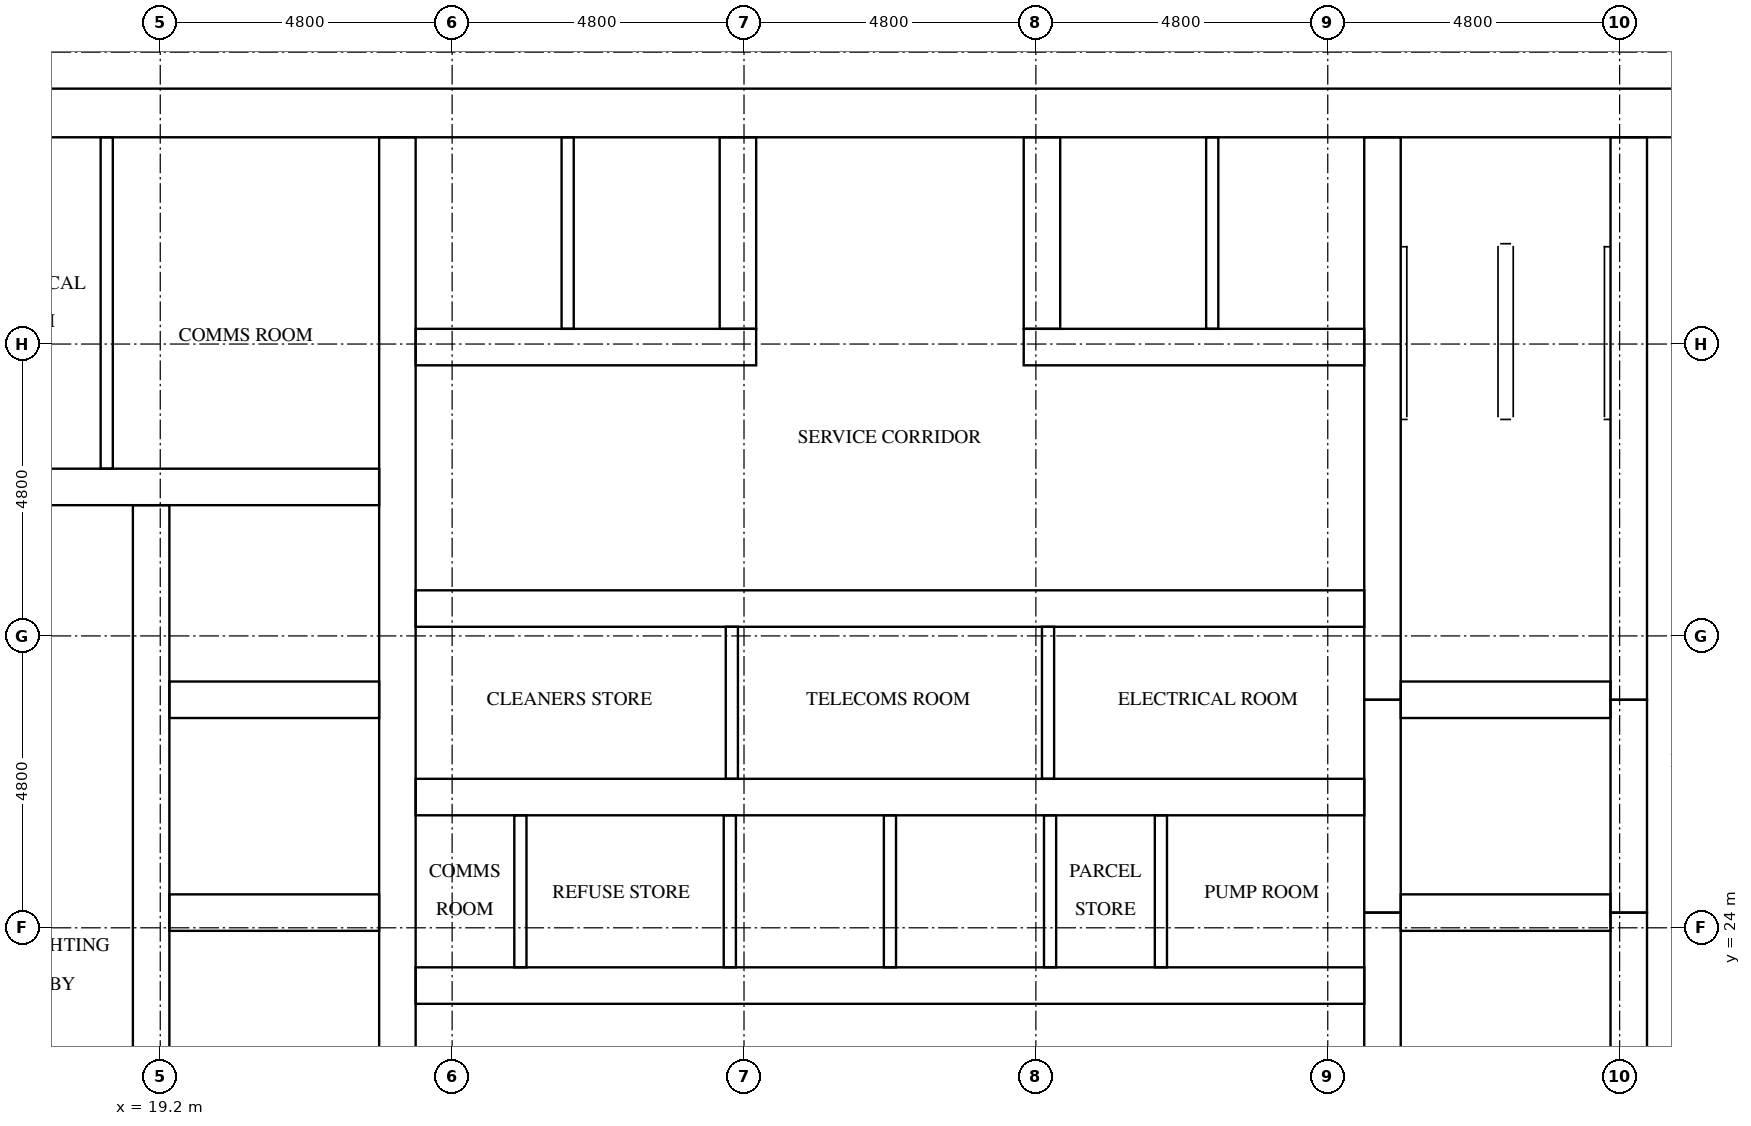
"""IFC4 building model, lengths in metres.
Left out: names, types, materials, properties, quantities, classifications, styles, units other than length and angle.
Written with IfcOpenShell. Run it as: python <this file> out.ifc"""

import sys

from ifc_helpers import new_model, si_unit, direction, frame, frame_2d, origin, place, context, subcontext, project, spatial, rectangle, extrude, element, fill, save


model = new_model("IFC4")
c1 = context("Model", 3, precision=1e-05, world=origin(), true_north=direction((0.0, 1.0)))
c2 = subcontext(c1, "Body", "Model", "MODEL_VIEW")
j1 = project(units=[si_unit("LENGTHUNIT", "METRE"), si_unit("PLANEANGLEUNIT", "RADIAN")], contexts=[c1])
p1 = place(None, origin())
s1 = spatial("IfcSite", under=j1, at=p1, CompositionType="ELEMENT")
p2 = place(p1, origin())
s2 = spatial("IfcBuilding", under=s1, at=p2, CompositionType="ELEMENT")
p3 = place(p2, frame((0.0, 0.0, 133.1)))
s3 = spatial("IfcBuildingStorey", under=s2, at=p3, CompositionType="ELEMENT", Elevation=133.1)
p4 = place(p3, frame((15.0, 37.4, 0.0), z_axis=(0.0, 0.0, 1.0), x_axis=(1.0, 0.0, 0.0)))
e1 = element("IfcWall", 1, at=p4, inside=s3, PredefinedType="SHEAR", context=c2, shape_type="SweptSolid", body=[
    extrude(rectangle(XDim=32.4, YDim=0.8, at=frame_2d((16.2, 0.0))), origin(), (0.0, 0.0, 1.0), 3.2),
])
p5 = place(p4, frame((15.3, 0.0, 0.0)))
e2 = element("IfcOpeningElement", 2, at=p5, cuts=e1, PredefinedType="OPENING", context=c2, shape_type="SweptSolid", body=[
    extrude(rectangle(XDim=1.8, YDim=2.1, at=frame_2d((0.9, 1.05))), frame((0.0, 0.41, 0.0), z_axis=(0.0, -1.0, 0.0), x_axis=(1.0, 0.0, 0.0)), (0.0, 0.0, 1.0), 0.82),
])
p6 = place(p4, frame((1.51, 0.0, 0.0)))
e3 = element("IfcOpeningElement", 3, at=p6, cuts=e1, PredefinedType="OPENING", context=c2, shape_type="SweptSolid", body=[
    extrude(rectangle(XDim=1.0, YDim=2.1, at=frame_2d((0.5, 1.05))), frame((0.0, 0.41, 0.0), z_axis=(0.0, -1.0, 0.0), x_axis=(1.0, 0.0, 0.0)), (0.0, 0.0, 1.0), 0.82),
])
p7 = place(p4, frame((5.11, 0.0, 0.0)))
e4 = element("IfcOpeningElement", 4, at=p7, cuts=e1, PredefinedType="OPENING", context=c2, shape_type="SweptSolid", body=[
    extrude(rectangle(XDim=1.0, YDim=2.1, at=frame_2d((0.5, 1.05))), frame((0.0, 0.41, 0.0), z_axis=(0.0, -1.0, 0.0), x_axis=(1.0, 0.0, 0.0)), (0.0, 0.0, 1.0), 0.82),
])
p8 = place(p3, frame((19.05, 15.8, 0.0), z_axis=(0.0, 0.0, 1.0), x_axis=(0.0, 1.0, 0.0)))
e5 = element("IfcWall", 5, at=p8, inside=s3, PredefinedType="SHEAR", context=c2, shape_type="SweptSolid", body=[
    extrude(rectangle(XDim=15.15, YDim=0.6, at=frame_2d((7.575, 0.0))), origin(), (0.0, 0.0, 1.0), 3.2),
])
p9 = place(p8, frame((9.65, 0.0, 0.0)))
e6 = element("IfcOpeningElement", 6, at=p9, cuts=e5, PredefinedType="OPENING", context=c2, shape_type="SweptSolid", body=[
    extrude(rectangle(XDim=1.1, YDim=2.1, at=frame_2d((0.55, 1.05))), frame((0.0, 0.31, 0.0), z_axis=(0.0, -1.0, 0.0), x_axis=(1.0, 0.0, 0.0)), (0.0, 0.0, 1.0), 0.62),
])
p10 = place(p8, frame((13.15, 0.0, 0.0)))
e7 = element("IfcOpeningElement", 7, at=p10, cuts=e5, PredefinedType="OPENING", context=c2, shape_type="SweptSolid", body=[
    extrude(rectangle(XDim=1.1, YDim=2.1, at=frame_2d((0.55, 1.05))), frame((0.0, 0.31, 0.0), z_axis=(0.0, -1.0, 0.0), x_axis=(1.0, 0.0, 0.0)), (0.0, 0.0, 1.0), 0.62),
])
p11 = place(p8, frame((0.4, 0.0, 0.0)))
e8 = element("IfcOpeningElement", 8, at=p11, cuts=e5, PredefinedType="OPENING", context=c2, shape_type="SweptSolid", body=[
    extrude(rectangle(XDim=1.2, YDim=2.1, at=frame_2d((0.6, 1.05))), frame((0.0, 0.31, 0.0), z_axis=(0.0, -1.0, 0.0), x_axis=(1.0, 0.0, 0.0)), (0.0, 0.0, 1.0), 0.62),
])
p12 = place(p3, frame((23.1, 15.8, 0.0), z_axis=(0.0, 0.0, 1.0), x_axis=(0.0, 1.0, 0.0)))
e9 = element("IfcWall", 9, at=p12, inside=s3, PredefinedType="SHEAR", context=c2, shape_type="SweptSolid", body=[
    extrude(rectangle(XDim=21.2, YDim=0.6, at=frame_2d((10.6, 0.0))), origin(), (0.0, 0.0, 1.0), 3.2),
])
p13 = place(p3, frame((39.3, 15.8, 0.0), z_axis=(0.0, 0.0, 1.0), x_axis=(0.0, 1.0, 0.0)))
e10 = element("IfcWall", 10, at=p13, inside=s3, PredefinedType="SHEAR", context=c2, shape_type="SweptSolid", body=[
    extrude(rectangle(XDim=8.45, YDim=0.6, at=frame_2d((4.225, 0.0))), origin(), (0.0, 0.0, 1.0), 3.2),
])
p14 = place(p3, frame((39.3, 24.25, 0.0), z_axis=(0.0, 0.0, 1.0), x_axis=(0.0, 1.0, 0.0)))
e11 = element("IfcWall", 11, at=p14, inside=s3, PredefinedType="SHEAR", context=c2, shape_type="SweptSolid", body=[
    extrude(rectangle(XDim=3.5, YDim=0.6, at=frame_2d((1.75, 0.0))), origin(), (0.0, 0.0, 1.0), 3.2),
])
p15 = place(p3, frame((39.3, 27.75, 0.0), z_axis=(0.0, 0.0, 1.0), x_axis=(0.0, 1.0, 0.0)))
e12 = element("IfcWall", 12, at=p15, inside=s3, PredefinedType="SHEAR", context=c2, shape_type="SweptSolid", body=[
    extrude(rectangle(XDim=9.25, YDim=0.6, at=frame_2d((4.625, 0.0))), origin(), (0.0, 0.0, 1.0), 3.2),
])
p16 = place(p3, frame((43.35, 15.8, 0.0), z_axis=(0.0, 0.0, 1.0), x_axis=(0.0, 1.0, 0.0)))
e13 = element("IfcWall", 13, at=p16, inside=s3, PredefinedType="SHEAR", context=c2, shape_type="SweptSolid", body=[
    extrude(rectangle(XDim=8.45, YDim=0.6, at=frame_2d((4.225, 0.0))), origin(), (0.0, 0.0, 1.0), 3.2),
])
p17 = place(p16, frame((0.4, 0.0, 0.0)))
e14 = element("IfcOpeningElement", 14, at=p17, cuts=e13, PredefinedType="OPENING", context=c2, shape_type="SweptSolid", body=[
    extrude(rectangle(XDim=1.2, YDim=2.1, at=frame_2d((0.6, 1.05))), frame((0.0, 0.31, 0.0), z_axis=(0.0, -1.0, 0.0), x_axis=(1.0, 0.0, 0.0)), (0.0, 0.0, 1.0), 0.62),
])
p18 = place(p3, frame((43.35, 24.25, 0.0), z_axis=(0.0, 0.0, 1.0), x_axis=(0.0, 1.0, 0.0)))
e15 = element("IfcWall", 15, at=p18, inside=s3, PredefinedType="SHEAR", context=c2, shape_type="SweptSolid", body=[
    extrude(rectangle(XDim=3.5, YDim=0.6, at=frame_2d((1.75, 0.0))), origin(), (0.0, 0.0, 1.0), 3.2),
])
p19 = place(p18, frame((1.2, 0.0, 0.0)))
e16 = element("IfcOpeningElement", 16, at=p19, cuts=e15, PredefinedType="OPENING", context=c2, shape_type="SweptSolid", body=[
    extrude(rectangle(XDim=1.1, YDim=2.1, at=frame_2d((0.55, 1.05))), frame((0.0, 0.31, 0.0), z_axis=(0.0, -1.0, 0.0), x_axis=(1.0, 0.0, 0.0)), (0.0, 0.0, 1.0), 0.62),
])
p20 = place(p3, frame((43.35, 27.75, 0.0), z_axis=(0.0, 0.0, 1.0), x_axis=(0.0, 1.0, 0.0)))
e17 = element("IfcWall", 17, at=p20, inside=s3, PredefinedType="SHEAR", context=c2, shape_type="SweptSolid", body=[
    extrude(rectangle(XDim=9.25, YDim=0.6, at=frame_2d((4.625, 0.0))), origin(), (0.0, 0.0, 1.0), 3.2),
])
p21 = place(p20, frame((7.65, 0.0, 0.0)))
e18 = element("IfcOpeningElement", 18, at=p21, cuts=e17, PredefinedType="OPENING", context=c2, shape_type="SweptSolid", body=[
    extrude(rectangle(XDim=1.2, YDim=2.1, at=frame_2d((0.6, 1.05))), frame((0.0, 0.31, 0.0), z_axis=(0.0, -1.0, 0.0), x_axis=(1.0, 0.0, 0.0)), (0.0, 0.0, 1.0), 0.62),
])
for number, where, z_axis, x_axis in (
    (19, (19.35, 24.25, 0.0), (0.0, 0.0, 1.0), (1.0, 0.0, 0.0)),
    (20, (19.35, 27.75, 0.0), (0.0, 0.0, 1.0), (1.0, 0.0, 0.0)),
):
    element("IfcWall", number, at=place(p3, frame(where, z_axis=z_axis, x_axis=x_axis)), inside=s3, PredefinedType="SHEAR", context=c2, shape_type="SweptSolid", body=[
        extrude(rectangle(XDim=3.45, YDim=0.6, at=frame_2d((1.725, 0.0))), origin(), (0.0, 0.0, 1.0), 3.2),
    ])
p22 = place(p3, frame((15.8, 31.25, 0.0), z_axis=(0.0, 0.0, 1.0), x_axis=(1.0, 0.0, 0.0)))
e21 = element("IfcWall", 21, at=p22, inside=s3, PredefinedType="SHEAR", context=c2, shape_type="SweptSolid", body=[
    extrude(rectangle(XDim=7.0, YDim=0.6, at=frame_2d((3.5, 0.0))), origin(), (0.0, 0.0, 1.0), 3.2),
])
for number, where, z_axis, x_axis in (
    (22, (39.6, 24.25, 0.0), (0.0, 0.0, 1.0), (1.0, 0.0, 0.0)),
    (23, (39.6, 27.75, 0.0), (0.0, 0.0, 1.0), (1.0, 0.0, 0.0)),
):
    element("IfcWall", number, at=place(p3, frame(where, z_axis=z_axis, x_axis=x_axis)), inside=s3, PredefinedType="SHEAR", context=c2, shape_type="SweptSolid", body=[
        extrude(rectangle(XDim=3.45, YDim=0.6, at=frame_2d((1.725, 0.0))), origin(), (0.0, 0.0, 1.0), 3.2),
    ])
p23 = place(p3, frame((23.4, 23.05, 0.0), z_axis=(0.0, 0.0, 1.0), x_axis=(1.0, 0.0, 0.0)))
e24 = element("IfcWall", 24, at=p23, inside=s3, PredefinedType="SHEAR", context=c2, shape_type="SweptSolid", body=[
    extrude(rectangle(XDim=15.6, YDim=0.6, at=frame_2d((7.8, 0.0))), origin(), (0.0, 0.0, 1.0), 3.2),
])
p24 = place(p23, frame((0.311, 0.0, 0.0)))
e25 = element("IfcOpeningElement", 25, at=p24, cuts=e24, PredefinedType="OPENING", context=c2, shape_type="SweptSolid", body=[
    extrude(rectangle(XDim=1.0, YDim=2.1, at=frame_2d((0.5, 1.05))), frame((0.0, 0.31, 0.0), z_axis=(0.0, -1.0, 0.0), x_axis=(1.0, 0.0, 0.0)), (0.0, 0.0, 1.0), 0.62),
])
p25 = place(p23, frame((2.945, 0.0, 0.0)))
e26 = element("IfcOpeningElement", 26, at=p25, cuts=e24, PredefinedType="OPENING", context=c2, shape_type="SweptSolid", body=[
    extrude(rectangle(XDim=1.0, YDim=2.1, at=frame_2d((0.5, 1.05))), frame((0.0, 0.31, 0.0), z_axis=(0.0, -1.0, 0.0), x_axis=(1.0, 0.0, 0.0)), (0.0, 0.0, 1.0), 0.62),
])
p26 = place(p23, frame((10.845, 0.0, 0.0)))
e27 = element("IfcOpeningElement", 27, at=p26, cuts=e24, PredefinedType="OPENING", context=c2, shape_type="SweptSolid", body=[
    extrude(rectangle(XDim=1.0, YDim=2.1, at=frame_2d((0.5, 1.05))), frame((0.0, 0.31, 0.0), z_axis=(0.0, -1.0, 0.0), x_axis=(1.0, 0.0, 0.0)), (0.0, 0.0, 1.0), 0.62),
])
p27 = place(p23, frame((13.478, 0.0, 0.0)))
e28 = element("IfcOpeningElement", 28, at=p27, cuts=e24, PredefinedType="OPENING", context=c2, shape_type="SweptSolid", body=[
    extrude(rectangle(XDim=1.0, YDim=2.1, at=frame_2d((0.5, 1.05))), frame((0.0, 0.31, 0.0), z_axis=(0.0, -1.0, 0.0), x_axis=(1.0, 0.0, 0.0)), (0.0, 0.0, 1.0), 0.62),
])
p28 = place(p3, frame((23.4, 26.15, 0.0), z_axis=(0.0, 0.0, 1.0), x_axis=(1.0, 0.0, 0.0)))
e29 = element("IfcWall", 29, at=p28, inside=s3, PredefinedType="SHEAR", context=c2, shape_type="SweptSolid", body=[
    extrude(rectangle(XDim=15.6, YDim=0.6, at=frame_2d((7.8, 0.0))), origin(), (0.0, 0.0, 1.0), 3.2),
])
p29 = place(p3, frame((23.4, 29.25, 0.0), z_axis=(0.0, 0.0, 1.0), x_axis=(1.0, 0.0, 0.0)))
e30 = element("IfcWall", 30, at=p29, inside=s3, PredefinedType="SHEAR", context=c2, shape_type="SweptSolid", body=[
    extrude(rectangle(XDim=15.6, YDim=0.6, at=frame_2d((7.8, 0.0))), origin(), (0.0, 0.0, 1.0), 3.2),
])
p30 = place(p29, frame((2.05, 0.0, 0.0)))
e31 = element("IfcOpeningElement", 31, at=p30, cuts=e30, PredefinedType="OPENING", context=c2, shape_type="SweptSolid", body=[
    extrude(rectangle(XDim=1.0, YDim=2.1, at=frame_2d((0.5, 1.05))), frame((0.0, 0.31, 0.0), z_axis=(0.0, -1.0, 0.0), x_axis=(1.0, 0.0, 0.0)), (0.0, 0.0, 1.0), 0.62),
])
p31 = place(p29, frame((7.3, 0.0, 0.0)))
e32 = element("IfcOpeningElement", 32, at=p31, cuts=e30, PredefinedType="OPENING", context=c2, shape_type="SweptSolid", body=[
    extrude(rectangle(XDim=1.0, YDim=2.1, at=frame_2d((0.5, 1.05))), frame((0.0, 0.31, 0.0), z_axis=(0.0, -1.0, 0.0), x_axis=(1.0, 0.0, 0.0)), (0.0, 0.0, 1.0), 0.62),
])
p32 = place(p29, frame((12.55, 0.0, 0.0)))
e33 = element("IfcOpeningElement", 33, at=p32, cuts=e30, PredefinedType="OPENING", context=c2, shape_type="SweptSolid", body=[
    extrude(rectangle(XDim=1.0, YDim=2.1, at=frame_2d((0.5, 1.05))), frame((0.0, 0.31, 0.0), z_axis=(0.0, -1.0, 0.0), x_axis=(1.0, 0.0, 0.0)), (0.0, 0.0, 1.0), 0.62),
])
for number, where, z_axis, x_axis in (
    (34, (23.4, 33.55, 0.0), (0.0, 0.0, 1.0), (1.0, 0.0, 0.0)),
    (35, (33.4, 33.55, 0.0), (0.0, 0.0, 1.0), (1.0, 0.0, 0.0)),
):
    element("IfcWall", number, at=place(p3, frame(where, z_axis=z_axis, x_axis=x_axis)), inside=s3, PredefinedType="SHEAR", context=c2, shape_type="SweptSolid", body=[
        extrude(rectangle(XDim=5.6, YDim=0.6, at=frame_2d((2.8, 0.0))), origin(), (0.0, 0.0, 1.0), 3.2),
    ])
for number, where, z_axis, x_axis in (
    (36, (28.7, 33.85, 0.0), (0.0, 0.0, 1.0), (0.0, 1.0, 0.0)),
    (37, (33.7, 33.85, 0.0), (0.0, 0.0, 1.0), (0.0, 1.0, 0.0)),
):
    element("IfcWall", number, at=place(p3, frame(where, z_axis=z_axis, x_axis=x_axis)), inside=s3, PredefinedType="SHEAR", context=c2, shape_type="SweptSolid", body=[
        extrude(rectangle(XDim=3.15, YDim=0.6, at=frame_2d((1.575, 0.0))), origin(), (0.0, 0.0, 1.0), 3.2),
    ])
for number, where, z_axis, x_axis in (
    (38, (28.567, 23.35, 0.0), (0.0, 0.0, 1.0), (0.0, 1.0, 0.0)),
    (39, (31.2, 23.35, 0.0), (0.0, 0.0, 1.0), (0.0, 1.0, 0.0)),
    (40, (33.833, 23.35, 0.0), (0.0, 0.0, 1.0), (0.0, 1.0, 0.0)),
):
    element("IfcWall", number, at=place(p3, frame(where, z_axis=z_axis, x_axis=x_axis)), inside=s3, PredefinedType="SOLIDWALL", context=c2, shape_type="SweptSolid", body=[
        extrude(rectangle(XDim=2.5, YDim=0.2, at=frame_2d((1.25, 0.0))), origin(), (0.0, 0.0, 1.0), 3.2),
    ])
for number, where, z_axis, x_axis in (
    (41, (25.9, 33.85, 0.0), (0.0, 0.0, 1.0), (0.0, 1.0, 0.0)),
    (42, (36.5, 33.85, 0.0), (0.0, 0.0, 1.0), (0.0, 1.0, 0.0)),
):
    element("IfcWall", number, at=place(p3, frame(where, z_axis=z_axis, x_axis=x_axis)), inside=s3, PredefinedType="SOLIDWALL", context=c2, shape_type="SweptSolid", body=[
        extrude(rectangle(XDim=3.15, YDim=0.2, at=frame_2d((1.575, 0.0))), origin(), (0.0, 0.0, 1.0), 3.2),
    ])
p33 = place(p3, frame((18.32, 31.55, 0.0), z_axis=(0.0, 0.0, 1.0), x_axis=(0.0, 1.0, 0.0)))
e43 = element("IfcWall", 43, at=p33, inside=s3, PredefinedType="PARTITIONING", context=c2, shape_type="SweptSolid", body=[
    extrude(rectangle(XDim=5.45, YDim=0.2, at=frame_2d((2.725, 0.0))), origin(), (0.0, 0.0, 1.0), 3.2),
])
for number, where, z_axis, x_axis in (
    (44, (25.123, 23.35, 0.0), (0.0, 0.0, 1.0), (0.0, 1.0, 0.0)),
    (45, (35.656, 23.35, 0.0), (0.0, 0.0, 1.0), (0.0, 1.0, 0.0)),
    (46, (28.6, 26.45, 0.0), (0.0, 0.0, 1.0), (0.0, 1.0, 0.0)),
    (47, (33.8, 26.45, 0.0), (0.0, 0.0, 1.0), (0.0, 1.0, 0.0)),
):
    element("IfcWall", number, at=place(p3, frame(where, z_axis=z_axis, x_axis=x_axis)), inside=s3, PredefinedType="PARTITIONING", context=c2, shape_type="SweptSolid", body=[
        extrude(rectangle(XDim=2.5, YDim=0.2, at=frame_2d((1.25, 0.0))), origin(), (0.0, 0.0, 1.0), 3.2),
    ])
p34 = place(p9, origin())
e48 = element("IfcDoor", 48, at=p34, inside=s3, OperationType="DOUBLE_DOOR_SLIDING", PredefinedType="DOOR", context=c2, shape_type="SweptSolid", body=[
    extrude(rectangle(XDim=1.1, YDim=2.1, at=frame_2d((0.55, 1.05))), frame((0.0, 0.025, 0.0), z_axis=(0.0, -1.0, 0.0), x_axis=(1.0, 0.0, 0.0)), (0.0, 0.0, 1.0), 0.05),
])
fill(e6, e48)
p35 = place(p10, origin())
e49 = element("IfcDoor", 49, at=p35, inside=s3, OperationType="DOUBLE_DOOR_SLIDING", PredefinedType="DOOR", context=c2, shape_type="SweptSolid", body=[
    extrude(rectangle(XDim=1.1, YDim=2.1, at=frame_2d((0.55, 1.05))), frame((0.0, 0.025, 0.0), z_axis=(0.0, -1.0, 0.0), x_axis=(1.0, 0.0, 0.0)), (0.0, 0.0, 1.0), 0.05),
])
fill(e7, e49)
p36 = place(p19, origin())
e50 = element("IfcDoor", 50, at=p36, inside=s3, OperationType="DOUBLE_DOOR_SLIDING", PredefinedType="DOOR", context=c2, shape_type="SweptSolid", body=[
    extrude(rectangle(XDim=1.1, YDim=2.1, at=frame_2d((0.55, 1.05))), frame((0.0, 0.025, 0.0), z_axis=(0.0, -1.0, 0.0), x_axis=(1.0, 0.0, 0.0)), (0.0, 0.0, 1.0), 0.05),
])
fill(e16, e50)
p37 = place(p21, origin())
e51 = element("IfcDoor", 51, at=p37, inside=s3, OperationType="SINGLE_SWING_RIGHT", PredefinedType="DOOR", context=c2, shape_type="SweptSolid", body=[
    extrude(rectangle(XDim=1.2, YDim=2.1, at=frame_2d((0.6, 1.05))), frame((0.0, 0.025, 0.0), z_axis=(0.0, -1.0, 0.0), x_axis=(1.0, 0.0, 0.0)), (0.0, 0.0, 1.0), 0.05),
])
fill(e18, e51)
p38 = place(p5, origin())
e52 = element("IfcDoor", 52, at=p38, inside=s3, OperationType="DOUBLE_DOOR_SINGLE_SWING", PredefinedType="DOOR", context=c2, shape_type="SweptSolid", body=[
    extrude(rectangle(XDim=1.8, YDim=2.1, at=frame_2d((0.9, 1.05))), frame((0.0, 0.025, 0.0), z_axis=(0.0, -1.0, 0.0), x_axis=(1.0, 0.0, 0.0)), (0.0, 0.0, 1.0), 0.05),
])
fill(e2, e52)
p39 = place(p6, origin())
e53 = element("IfcDoor", 53, at=p39, inside=s3, OperationType="SINGLE_SWING_LEFT", PredefinedType="DOOR", context=c2, shape_type="SweptSolid", body=[
    extrude(rectangle(XDim=1.0, YDim=2.1, at=frame_2d((0.5, 1.05))), frame((0.0, 0.025, 0.0), z_axis=(0.0, -1.0, 0.0), x_axis=(1.0, 0.0, 0.0)), (0.0, 0.0, 1.0), 0.05),
])
fill(e3, e53)
p40 = place(p7, origin())
e54 = element("IfcDoor", 54, at=p40, inside=s3, OperationType="SINGLE_SWING_RIGHT", PredefinedType="DOOR", context=c2, shape_type="SweptSolid", body=[
    extrude(rectangle(XDim=1.0, YDim=2.1, at=frame_2d((0.5, 1.05))), frame((0.0, 0.025, 0.0), z_axis=(0.0, -1.0, 0.0), x_axis=(1.0, 0.0, 0.0)), (0.0, 0.0, 1.0), 0.05),
])
fill(e4, e54)
p41 = place(p24, frame((1.0, 0.0, 0.0), z_axis=(0.0, 0.0, 1.0), x_axis=(-1.0, 0.0, 0.0)))
e55 = element("IfcDoor", 55, at=p41, inside=s3, OperationType="SINGLE_SWING_LEFT", PredefinedType="DOOR", context=c2, shape_type="SweptSolid", body=[
    extrude(rectangle(XDim=1.0, YDim=2.1, at=frame_2d((0.5, 1.05))), frame((0.0, 0.025, 0.0), z_axis=(0.0, -1.0, 0.0), x_axis=(1.0, 0.0, 0.0)), (0.0, 0.0, 1.0), 0.05),
])
fill(e25, e55)
p42 = place(p25, frame((1.0, 0.0, 0.0), z_axis=(0.0, 0.0, 1.0), x_axis=(-1.0, 0.0, 0.0)))
e56 = element("IfcDoor", 56, at=p42, inside=s3, OperationType="SINGLE_SWING_RIGHT", PredefinedType="DOOR", context=c2, shape_type="SweptSolid", body=[
    extrude(rectangle(XDim=1.0, YDim=2.1, at=frame_2d((0.5, 1.05))), frame((0.0, 0.025, 0.0), z_axis=(0.0, -1.0, 0.0), x_axis=(1.0, 0.0, 0.0)), (0.0, 0.0, 1.0), 0.05),
])
fill(e26, e56)
p43 = place(p26, frame((1.0, 0.0, 0.0), z_axis=(0.0, 0.0, 1.0), x_axis=(-1.0, 0.0, 0.0)))
e57 = element("IfcDoor", 57, at=p43, inside=s3, OperationType="SINGLE_SWING_LEFT", PredefinedType="DOOR", context=c2, shape_type="SweptSolid", body=[
    extrude(rectangle(XDim=1.0, YDim=2.1, at=frame_2d((0.5, 1.05))), frame((0.0, 0.025, 0.0), z_axis=(0.0, -1.0, 0.0), x_axis=(1.0, 0.0, 0.0)), (0.0, 0.0, 1.0), 0.05),
])
fill(e27, e57)
p44 = place(p27, frame((1.0, 0.0, 0.0), z_axis=(0.0, 0.0, 1.0), x_axis=(-1.0, 0.0, 0.0)))
e58 = element("IfcDoor", 58, at=p44, inside=s3, OperationType="SINGLE_SWING_RIGHT", PredefinedType="DOOR", context=c2, shape_type="SweptSolid", body=[
    extrude(rectangle(XDim=1.0, YDim=2.1, at=frame_2d((0.5, 1.05))), frame((0.0, 0.025, 0.0), z_axis=(0.0, -1.0, 0.0), x_axis=(1.0, 0.0, 0.0)), (0.0, 0.0, 1.0), 0.05),
])
fill(e28, e58)
p45 = place(p30, origin())
e59 = element("IfcDoor", 59, at=p45, inside=s3, OperationType="SINGLE_SWING_LEFT", PredefinedType="DOOR", context=c2, shape_type="SweptSolid", body=[
    extrude(rectangle(XDim=1.0, YDim=2.1, at=frame_2d((0.5, 1.05))), frame((0.0, 0.025, 0.0), z_axis=(0.0, -1.0, 0.0), x_axis=(1.0, 0.0, 0.0)), (0.0, 0.0, 1.0), 0.05),
])
fill(e31, e59)
p46 = place(p31, origin())
e60 = element("IfcDoor", 60, at=p46, inside=s3, OperationType="SINGLE_SWING_RIGHT", PredefinedType="DOOR", context=c2, shape_type="SweptSolid", body=[
    extrude(rectangle(XDim=1.0, YDim=2.1, at=frame_2d((0.5, 1.05))), frame((0.0, 0.025, 0.0), z_axis=(0.0, -1.0, 0.0), x_axis=(1.0, 0.0, 0.0)), (0.0, 0.0, 1.0), 0.05),
])
fill(e32, e60)
p47 = place(p32, origin())
e61 = element("IfcDoor", 61, at=p47, inside=s3, OperationType="SINGLE_SWING_LEFT", PredefinedType="DOOR", context=c2, shape_type="SweptSolid", body=[
    extrude(rectangle(XDim=1.0, YDim=2.1, at=frame_2d((0.5, 1.05))), frame((0.0, 0.025, 0.0), z_axis=(0.0, -1.0, 0.0), x_axis=(1.0, 0.0, 0.0)), (0.0, 0.0, 1.0), 0.05),
])
fill(e33, e61)
save(model, sys.argv[1])
